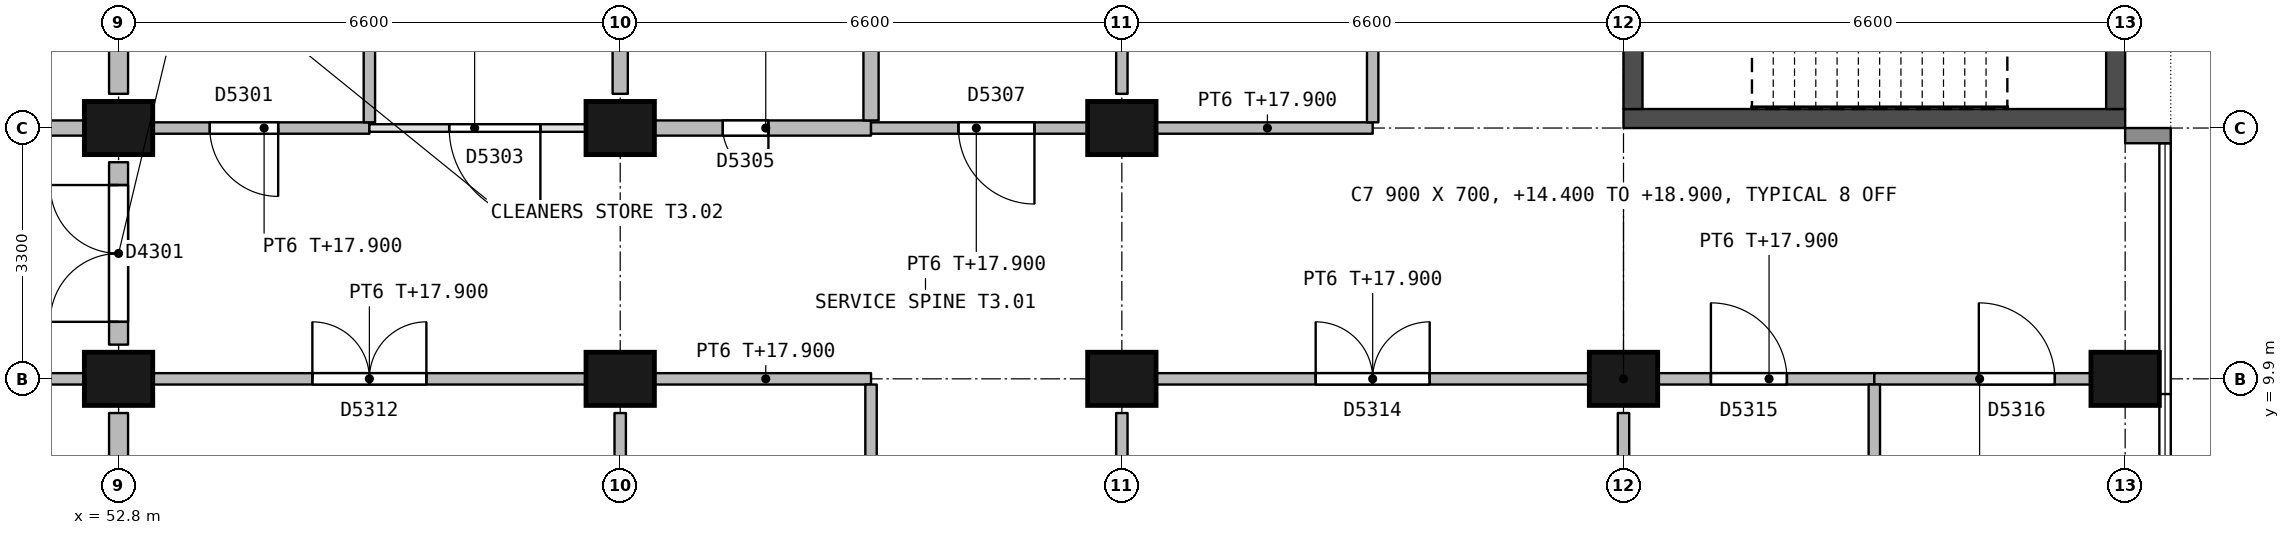
"""IFC4 building model, lengths in metres.
Left out: names, types, materials, properties, quantities, classifications, styles, units other than length and angle.
Written with IfcOpenShell. Run it as: python <this file> out.ifc"""

import sys

from ifc_helpers import new_model, si_unit, direction, frame, frame_2d, origin, origin_2d, place, context, subcontext, project, spatial, rectangle, extrude, element, fill, save


model = new_model("IFC4")
c1 = context("Model", 3, precision=1e-05, world=origin(), true_north=direction((0.0, 1.0)))
c2 = subcontext(c1, "Body", "Model", "MODEL_VIEW")
j1 = project(units=[si_unit("LENGTHUNIT", "METRE"), si_unit("PLANEANGLEUNIT", "RADIAN")], contexts=[c1])
p1 = place(None, origin())
s1 = spatial("IfcSite", under=j1, at=p1, CompositionType="ELEMENT")
p2 = place(p1, origin())
s2 = spatial("IfcBuilding", under=s1, at=p2, CompositionType="ELEMENT")
p3 = place(p2, frame((0.0, 0.0, 14.4)))
s3 = spatial("IfcBuildingStorey", under=s2, at=p3, CompositionType="ELEMENT", Elevation=14.4)
for number, where, z_axis, x_axis in (
    (1, (52.8, 9.9, 0.0), (0.0, 0.0, 1.0), (1.0, 0.0, 0.0)),
    (2, (52.8, 13.2, 0.0), (0.0, 0.0, 1.0), (1.0, 0.0, 0.0)),
    (3, (59.4, 9.9, 0.0), (0.0, 0.0, 1.0), (1.0, 0.0, 0.0)),
    (4, (59.4, 13.2, 0.0), (0.0, 0.0, 1.0), (1.0, 0.0, 0.0)),
    (5, (66.0, 9.9, 0.0), (0.0, 0.0, 1.0), (1.0, 0.0, 0.0)),
    (6, (66.0, 13.2, 0.0), (0.0, 0.0, 1.0), (1.0, 0.0, 0.0)),
    (7, (72.6, 9.9, 0.0), (0.0, 0.0, 1.0), (1.0, 0.0, 0.0)),
    (8, (79.2, 9.9, 0.0), (0.0, 0.0, 1.0), (1.0, 0.0, 0.0)),
):
    element("IfcColumn", number, at=place(p3, frame(where, z_axis=z_axis, x_axis=x_axis)), inside=s3, PredefinedType="COLUMN", context=c2, shape_type="SweptSolid", body=[
        extrude(rectangle(XDim=0.9, YDim=0.7, at=origin_2d()), origin(), (0.0, 0.0, 1.0), 4.5),
    ])
p4 = place(p3, frame((72.6, 13.325, 0.0), z_axis=(0.0, 0.0, 1.0), x_axis=(1.0, 0.0, 0.0)))
e9 = element("IfcWall", 9, at=p4, inside=s3, PredefinedType="SHEAR", context=c2, shape_type="SweptSolid", body=[
    extrude(rectangle(XDim=6.6, YDim=0.25, at=frame_2d((3.3, 0.0))), origin(), (0.0, 0.0, 1.0), 4.2),
])
p5 = place(p3, frame((72.725, 13.45, 0.0), z_axis=(0.0, 0.0, 1.0), x_axis=(0.0, 1.0, 0.0)))
e10 = element("IfcWall", 10, at=p5, inside=s3, PredefinedType="SHEAR", context=c2, shape_type="SweptSolid", body=[
    extrude(rectangle(XDim=9.4, YDim=0.25, at=frame_2d((4.7, 0.0))), origin(), (0.0, 0.0, 1.0), 4.2),
])
p6 = place(p5, frame((4.125, 0.0, 0.0)))
e11 = element("IfcOpeningElement", 11, at=p6, cuts=e10, PredefinedType="OPENING", context=c2, shape_type="SweptSolid", body=[
    extrude(rectangle(XDim=1.2, YDim=2.1, at=frame_2d((0.6, 1.05))), frame((0.0, 0.135, 0.0), z_axis=(0.0, -1.0, 0.0), x_axis=(1.0, 0.0, 0.0)), (0.0, 0.0, 1.0), 0.27),
])
p7 = place(p3, frame((79.075, 13.45, 0.0), z_axis=(0.0, 0.0, 1.0), x_axis=(0.0, 1.0, 0.0)))
e12 = element("IfcWall", 12, at=p7, inside=s3, PredefinedType="SHEAR", context=c2, shape_type="SweptSolid", body=[
    extrude(rectangle(XDim=9.4, YDim=0.25, at=frame_2d((4.7, 0.0))), origin(), (0.0, 0.0, 1.0), 4.2),
])
p8 = place(p7, frame((0.95, 0.0, 0.7)))
e13 = element("IfcOpeningElement", 13, at=p8, cuts=e12, PredefinedType="OPENING", context=c2, shape_type="SweptSolid", body=[
    extrude(rectangle(XDim=1.2, YDim=1.8, at=frame_2d((0.6, 0.9))), frame((0.0, 0.135, 0.0), z_axis=(0.0, -1.0, 0.0), x_axis=(1.0, 0.0, 0.0)), (0.0, 0.0, 1.0), 0.27),
])
p9 = place(p3, frame((79.2, 13.1, 0.0), z_axis=(0.0, 0.0, 1.0), x_axis=(1.0, 0.0, 0.0)))
e14 = element("IfcWall", 14, at=p9, inside=s3, PredefinedType="STANDARD", context=c2, shape_type="SweptSolid", body=[
    extrude(rectangle(XDim=0.6, YDim=0.2, at=frame_2d((0.3, 0.0))), origin(), (0.0, 0.0, 1.0), 3.5),
])
p10 = place(p3, frame((49.5, 13.2, 0.0), z_axis=(0.0, 0.0, 1.0), x_axis=(1.0, 0.0, 0.0)))
e15 = element("IfcWall", 15, at=p10, inside=s3, PredefinedType="PARTITIONING", context=c2, shape_type="SweptSolid", body=[
    extrude(rectangle(XDim=2.85, YDim=0.2, at=frame_2d((1.425, 0.0))), origin(), (0.0, 0.0, 1.0), 3.5),
])
p11 = place(p10, frame((1.35, 0.0, 0.0)))
e16 = element("IfcOpeningElement", 16, at=p11, cuts=e15, PredefinedType="OPENING", context=c2, shape_type="SweptSolid", body=[
    extrude(rectangle(XDim=0.6, YDim=2.1, at=frame_2d((0.3, 1.05))), frame((0.0, 0.11, 0.0), z_axis=(0.0, -1.0, 0.0), x_axis=(1.0, 0.0, 0.0)), (0.0, 0.0, 1.0), 0.22),
])
p12 = place(p3, frame((46.55, 9.9, 0.0), z_axis=(0.0, 0.0, 1.0), x_axis=(1.0, 0.0, 0.0)))
e17 = element("IfcWall", 17, at=p12, inside=s3, PredefinedType="PARTITIONING", context=c2, shape_type="SweptSolid", body=[
    extrude(rectangle(XDim=5.8, YDim=0.15, at=frame_2d((2.9, 0.0))), origin(), (0.0, 0.0, 1.0), 3.5),
])
p13 = place(p12, frame((2.2, 0.0, 0.0)))
e18 = element("IfcOpeningElement", 18, at=p13, cuts=e17, PredefinedType="OPENING", context=c2, shape_type="SweptSolid", body=[
    extrude(rectangle(XDim=1.5, YDim=2.1, at=frame_2d((0.75, 1.05))), frame((0.0, 0.085, 0.0), z_axis=(0.0, -1.0, 0.0), x_axis=(1.0, 0.0, 0.0)), (0.0, 0.0, 1.0), 0.17),
])
p14 = place(p3, frame((52.8, 10.35, 0.0), z_axis=(0.0, 0.0, 1.0), x_axis=(0.0, 1.0, 0.0)))
e19 = element("IfcWall", 19, at=p14, inside=s3, PredefinedType="PARTITIONING", context=c2, shape_type="SweptSolid", body=[
    extrude(rectangle(XDim=2.4, YDim=0.25, at=frame_2d((1.2, 0.0))), origin(), (0.0, 0.0, 1.0), 3.6),
])
p15 = place(p14, frame((0.3, 0.0, 0.0)))
e20 = element("IfcOpeningElement", 20, at=p15, cuts=e19, PredefinedType="OPENING", context=c2, shape_type="SweptSolid", body=[
    extrude(rectangle(XDim=1.8, YDim=2.1, at=frame_2d((0.9, 1.05))), frame((0.0, 0.135, 0.0), z_axis=(0.0, -1.0, 0.0), x_axis=(1.0, 0.0, 0.0)), (0.0, 0.0, 1.0), 0.27),
])
p16 = place(p3, frame((52.8, 13.65, 0.0), z_axis=(0.0, 0.0, 1.0), x_axis=(0.0, 1.0, 0.0)))
e21 = element("IfcWall", 21, at=p16, inside=s3, PredefinedType="PARTITIONING", context=c2, shape_type="SweptSolid", body=[
    extrude(rectangle(XDim=2.75, YDim=0.25, at=frame_2d((1.375, 0.0))), origin(), (0.0, 0.0, 1.0), 3.3),
])
p17 = place(p3, frame((52.8, 3.9, 0.0), z_axis=(0.0, 0.0, 1.0), x_axis=(0.0, 1.0, 0.0)))
e22 = element("IfcWall", 22, at=p17, inside=s3, PredefinedType="PARTITIONING", context=c2, shape_type="SweptSolid", body=[
    extrude(rectangle(XDim=5.55, YDim=0.25, at=frame_2d((2.775, 0.0))), origin(), (0.0, 0.0, 1.0), 3.3),
])
p18 = place(p3, frame((56.1, 13.2, 0.0), z_axis=(0.0, 0.0, 1.0), x_axis=(-1.0, 0.0, 0.0)))
e23 = element("IfcWall", 23, at=p18, inside=s3, PredefinedType="PARTITIONING", context=c2, shape_type="SweptSolid", body=[
    extrude(rectangle(XDim=2.85, YDim=0.15, at=frame_2d((1.425, 0.0))), origin(), (0.0, 0.0, 1.0), 3.5),
])
p19 = place(p18, frame((1.2, 0.0, 0.0)))
e24 = element("IfcOpeningElement", 24, at=p19, cuts=e23, PredefinedType="OPENING", context=c2, shape_type="SweptSolid", body=[
    extrude(rectangle(XDim=0.9, YDim=2.1, at=frame_2d((0.45, 1.05))), frame((0.0, 0.085, 0.0), z_axis=(0.0, -1.0, 0.0), x_axis=(1.0, 0.0, 0.0)), (0.0, 0.0, 1.0), 0.17),
])
p20 = place(p3, frame((56.1, 13.2, 0.0), z_axis=(0.0, 0.0, 1.0), x_axis=(1.0, 0.0, 0.0)))
e25 = element("IfcWall", 25, at=p20, inside=s3, PredefinedType="PARTITIONING", context=c2, shape_type="SweptSolid", body=[
    extrude(rectangle(XDim=2.85, YDim=0.1, at=frame_2d((1.425, 0.0))), origin(), (0.0, 0.0, 1.0), 3.5),
])
p21 = place(p20, frame((1.05, 0.0, 0.0)))
e26 = element("IfcOpeningElement", 26, at=p21, cuts=e25, PredefinedType="OPENING", context=c2, shape_type="SweptSolid", body=[
    extrude(rectangle(XDim=1.2, YDim=2.1, at=frame_2d((0.6, 1.05))), frame((0.0, 0.06, 0.0), z_axis=(0.0, -1.0, 0.0), x_axis=(1.0, 0.0, 0.0)), (0.0, 0.0, 1.0), 0.12),
])
p22 = place(p3, frame((59.85, 13.2, 0.0), z_axis=(0.0, 0.0, 1.0), x_axis=(1.0, 0.0, 0.0)))
e27 = element("IfcWall", 27, at=p22, inside=s3, PredefinedType="PARTITIONING", context=c2, shape_type="SweptSolid", body=[
    extrude(rectangle(XDim=2.85, YDim=0.2, at=frame_2d((1.425, 0.0))), origin(), (0.0, 0.0, 1.0), 3.5),
])
p23 = place(p22, frame((0.9, 0.0, 0.0)))
e28 = element("IfcOpeningElement", 28, at=p23, cuts=e27, PredefinedType="OPENING", context=c2, shape_type="SweptSolid", body=[
    extrude(rectangle(XDim=0.6, YDim=2.1, at=frame_2d((0.3, 1.05))), frame((0.0, 0.11, 0.0), z_axis=(0.0, -1.0, 0.0), x_axis=(1.0, 0.0, 0.0)), (0.0, 0.0, 1.0), 0.22),
])
p24 = place(p3, frame((65.55, 13.2, 0.0), z_axis=(0.0, 0.0, 1.0), x_axis=(-1.0, 0.0, 0.0)))
e29 = element("IfcWall", 29, at=p24, inside=s3, PredefinedType="PARTITIONING", context=c2, shape_type="SweptSolid", body=[
    extrude(rectangle(XDim=2.85, YDim=0.15, at=frame_2d((1.425, 0.0))), origin(), (0.0, 0.0, 1.0), 3.5),
])
p25 = place(p24, frame((0.7, 0.0, 0.0)))
e30 = element("IfcOpeningElement", 30, at=p25, cuts=e29, PredefinedType="OPENING", context=c2, shape_type="SweptSolid", body=[
    extrude(rectangle(XDim=1.0, YDim=2.1, at=frame_2d((0.5, 1.05))), frame((0.0, 0.085, 0.0), z_axis=(0.0, -1.0, 0.0), x_axis=(1.0, 0.0, 0.0)), (0.0, 0.0, 1.0), 0.17),
])
p26 = place(p3, frame((69.3, 13.2, 0.0), z_axis=(0.0, 0.0, 1.0), x_axis=(-1.0, 0.0, 0.0)))
e31 = element("IfcWall", 31, at=p26, inside=s3, PredefinedType="PARTITIONING", context=c2, shape_type="SweptSolid", body=[
    extrude(rectangle(XDim=2.85, YDim=0.15, at=frame_2d((1.425, 0.0))), origin(), (0.0, 0.0, 1.0), 3.5),
])
p27 = place(p3, frame((53.25, 9.9, 0.0), z_axis=(0.0, 0.0, 1.0), x_axis=(1.0, 0.0, 0.0)))
e32 = element("IfcWall", 32, at=p27, inside=s3, PredefinedType="PARTITIONING", context=c2, shape_type="SweptSolid", body=[
    extrude(rectangle(XDim=5.7, YDim=0.15, at=frame_2d((2.85, 0.0))), origin(), (0.0, 0.0, 1.0), 3.5),
])
p28 = place(p27, frame((2.1, 0.0, 0.0)))
e33 = element("IfcOpeningElement", 33, at=p28, cuts=e32, PredefinedType="OPENING", context=c2, shape_type="SweptSolid", body=[
    extrude(rectangle(XDim=1.5, YDim=2.1, at=frame_2d((0.75, 1.05))), frame((0.0, 0.085, 0.0), z_axis=(0.0, -1.0, 0.0), x_axis=(1.0, 0.0, 0.0)), (0.0, 0.0, 1.0), 0.17),
])
p29 = place(p3, frame((59.85, 9.9, 0.0), z_axis=(0.0, 0.0, 1.0), x_axis=(1.0, 0.0, 0.0)))
e34 = element("IfcWall", 34, at=p29, inside=s3, PredefinedType="PARTITIONING", context=c2, shape_type="SweptSolid", body=[
    extrude(rectangle(XDim=2.85, YDim=0.15, at=frame_2d((1.425, 0.0))), origin(), (0.0, 0.0, 1.0), 3.5),
])
p30 = place(p3, frame((66.45, 9.9, 0.0), z_axis=(0.0, 0.0, 1.0), x_axis=(1.0, 0.0, 0.0)))
e35 = element("IfcWall", 35, at=p30, inside=s3, PredefinedType="PARTITIONING", context=c2, shape_type="SweptSolid", body=[
    extrude(rectangle(XDim=5.7, YDim=0.15, at=frame_2d((2.85, 0.0))), origin(), (0.0, 0.0, 1.0), 3.5),
])
p31 = place(p30, frame((2.1, 0.0, 0.0)))
e36 = element("IfcOpeningElement", 36, at=p31, cuts=e35, PredefinedType="OPENING", context=c2, shape_type="SweptSolid", body=[
    extrude(rectangle(XDim=1.5, YDim=2.1, at=frame_2d((0.75, 1.05))), frame((0.0, 0.085, 0.0), z_axis=(0.0, -1.0, 0.0), x_axis=(1.0, 0.0, 0.0)), (0.0, 0.0, 1.0), 0.17),
])
p32 = place(p3, frame((73.05, 9.9, 0.0), z_axis=(0.0, 0.0, 1.0), x_axis=(1.0, 0.0, 0.0)))
e37 = element("IfcWall", 37, at=p32, inside=s3, PredefinedType="PARTITIONING", context=c2, shape_type="SweptSolid", body=[
    extrude(rectangle(XDim=2.85, YDim=0.15, at=frame_2d((1.425, 0.0))), origin(), (0.0, 0.0, 1.0), 3.5),
])
p33 = place(p32, frame((0.7, 0.0, 0.0)))
e38 = element("IfcOpeningElement", 38, at=p33, cuts=e37, PredefinedType="OPENING", context=c2, shape_type="SweptSolid", body=[
    extrude(rectangle(XDim=1.0, YDim=2.1, at=frame_2d((0.5, 1.05))), frame((0.0, 0.085, 0.0), z_axis=(0.0, -1.0, 0.0), x_axis=(1.0, 0.0, 0.0)), (0.0, 0.0, 1.0), 0.17),
])
p34 = place(p3, frame((75.9, 9.9, 0.0), z_axis=(0.0, 0.0, 1.0), x_axis=(1.0, 0.0, 0.0)))
e39 = element("IfcWall", 39, at=p34, inside=s3, PredefinedType="PARTITIONING", context=c2, shape_type="SweptSolid", body=[
    extrude(rectangle(XDim=2.85, YDim=0.15, at=frame_2d((1.425, 0.0))), origin(), (0.0, 0.0, 1.0), 3.5),
])
p35 = place(p34, frame((1.375, 0.0, 0.0)))
e40 = element("IfcOpeningElement", 40, at=p35, cuts=e39, PredefinedType="OPENING", context=c2, shape_type="SweptSolid", body=[
    extrude(rectangle(XDim=1.0, YDim=2.1, at=frame_2d((0.5, 1.05))), frame((0.0, 0.085, 0.0), z_axis=(0.0, -1.0, 0.0), x_axis=(1.0, 0.0, 0.0)), (0.0, 0.0, 1.0), 0.17),
])
p36 = place(p3, frame((56.1, 13.275, 0.0), z_axis=(0.0, 0.0, 1.0), x_axis=(0.0, 1.0, 0.0)))
e41 = element("IfcWall", 41, at=p36, inside=s3, PredefinedType="PARTITIONING", context=c2, shape_type="SweptSolid", body=[
    extrude(rectangle(XDim=3.15, YDim=0.15, at=frame_2d((1.575, 0.0))), origin(), (0.0, 0.0, 1.0), 4.2),
])
p37 = place(p3, frame((59.4, 13.65, 0.0), z_axis=(0.0, 0.0, 1.0), x_axis=(0.0, 1.0, 0.0)))
e42 = element("IfcWall", 42, at=p37, inside=s3, PredefinedType="PARTITIONING", context=c2, shape_type="SweptSolid", body=[
    extrude(rectangle(XDim=2.85, YDim=0.2, at=frame_2d((1.425, 0.0))), origin(), (0.0, 0.0, 1.0), 3.3),
])
p38 = place(p3, frame((62.7, 13.3, 0.0), z_axis=(0.0, 0.0, 1.0), x_axis=(0.0, 1.0, 0.0)))
e43 = element("IfcWall", 43, at=p38, inside=s3, PredefinedType="PARTITIONING", context=c2, shape_type="SweptSolid", body=[
    extrude(rectangle(XDim=3.1, YDim=0.2, at=frame_2d((1.55, 0.0))), origin(), (0.0, 0.0, 1.0), 4.2),
])
p39 = place(p3, frame((66.0, 13.65, 0.0), z_axis=(0.0, 0.0, 1.0), x_axis=(0.0, 1.0, 0.0)))
e44 = element("IfcWall", 44, at=p39, inside=s3, PredefinedType="PARTITIONING", context=c2, shape_type="SweptSolid", body=[
    extrude(rectangle(XDim=9.0, YDim=0.15, at=frame_2d((4.5, 0.0))), origin(), (0.0, 0.0, 1.0), 3.3),
])
p40 = place(p3, frame((69.3, 23.55, 0.0), z_axis=(0.0, 0.0, 1.0), x_axis=(0.0, -1.0, 0.0)))
e45 = element("IfcWall", 45, at=p40, inside=s3, PredefinedType="PARTITIONING", context=c2, shape_type="SweptSolid", body=[
    extrude(rectangle(XDim=10.275, YDim=0.15, at=frame_2d((5.138, 0.0))), origin(), (0.0, 0.0, 1.0), 4.2),
])
p41 = place(p40, frame((4.275, 0.0, 0.0)))
e46 = element("IfcOpeningElement", 46, at=p41, cuts=e45, PredefinedType="OPENING", context=c2, shape_type="SweptSolid", body=[
    extrude(rectangle(XDim=1.8, YDim=2.4, at=frame_2d((0.9, 1.2))), frame((0.0, 0.085, 0.0), z_axis=(0.0, -1.0, 0.0), x_axis=(1.0, 0.0, 0.0)), (0.0, 0.0, 1.0), 0.17),
])
p42 = place(p3, frame((59.4, 3.975, 0.0), z_axis=(0.0, 0.0, 1.0), x_axis=(0.0, 1.0, 0.0)))
e47 = element("IfcWall", 47, at=p42, inside=s3, PredefinedType="PARTITIONING", context=c2, shape_type="SweptSolid", body=[
    extrude(rectangle(XDim=5.475, YDim=0.15, at=frame_2d((2.737, 0.0))), origin(), (0.0, 0.0, 1.0), 3.3),
])
p43 = place(p3, frame((62.7, 9.825, 0.0), z_axis=(0.0, 0.0, 1.0), x_axis=(0.0, -1.0, 0.0)))
e48 = element("IfcWall", 48, at=p43, inside=s3, PredefinedType="PARTITIONING", context=c2, shape_type="SweptSolid", body=[
    extrude(rectangle(XDim=5.85, YDim=0.15, at=frame_2d((2.925, 0.0))), origin(), (0.0, 0.0, 1.0), 4.2),
])
p44 = place(p43, frame((2.425, 0.0, 0.0)))
e49 = element("IfcOpeningElement", 49, at=p44, cuts=e48, PredefinedType="OPENING", context=c2, shape_type="SweptSolid", body=[
    extrude(rectangle(XDim=1.0, YDim=2.1, at=frame_2d((0.5, 1.05))), frame((0.0, 0.085, 0.0), z_axis=(0.0, -1.0, 0.0), x_axis=(1.0, 0.0, 0.0)), (0.0, 0.0, 1.0), 0.17),
])
for number, where, z_axis, x_axis in (
    (50, (66.0, 3.975, 0.0), (0.0, 0.0, 1.0), (0.0, 1.0, 0.0)),
    (51, (72.6, 3.975, 0.0), (0.0, 0.0, 1.0), (0.0, 1.0, 0.0)),
):
    element("IfcWall", number, at=place(p3, frame(where, z_axis=z_axis, x_axis=x_axis)), inside=s3, PredefinedType="PARTITIONING", context=c2, shape_type="SweptSolid", body=[
        extrude(rectangle(XDim=5.475, YDim=0.15, at=frame_2d((2.737, 0.0))), origin(), (0.0, 0.0, 1.0), 3.3),
    ])
p45 = place(p3, frame((75.9, 3.975, 0.0), z_axis=(0.0, 0.0, 1.0), x_axis=(0.0, 1.0, 0.0)))
e52 = element("IfcWall", 52, at=p45, inside=s3, PredefinedType="PARTITIONING", context=c2, shape_type="SweptSolid", body=[
    extrude(rectangle(XDim=5.85, YDim=0.15, at=frame_2d((2.925, 0.0))), origin(), (0.0, 0.0, 1.0), 4.2),
])
p46 = place(p15, origin())
e53 = element("IfcDoor", 53, at=p46, inside=s3, OperationType="DOUBLE_DOOR_SINGLE_SWING", PredefinedType="DOOR", context=c2, shape_type="SweptSolid", body=[
    extrude(rectangle(XDim=1.8, YDim=2.1, at=frame_2d((0.9, 1.05))), frame((0.0, 0.03, 0.0), z_axis=(0.0, -1.0, 0.0), x_axis=(1.0, 0.0, 0.0)), (0.0, 0.0, 1.0), 0.06),
])
fill(e20, e53)
p47 = place(p19, origin())
e54 = element("IfcDoor", 54, at=p47, inside=s3, OperationType="SINGLE_SWING_LEFT", PredefinedType="DOOR", context=c2, shape_type="SweptSolid", body=[
    extrude(rectangle(XDim=0.9, YDim=2.1, at=frame_2d((0.45, 1.05))), frame((0.0, 0.027, 0.0), z_axis=(0.0, -1.0, 0.0), x_axis=(1.0, 0.0, 0.0)), (0.0, 0.0, 1.0), 0.054),
])
fill(e24, e54)
p48 = place(p21, origin())
e55 = element("IfcDoor", 55, at=p48, inside=s3, OperationType="SINGLE_SWING_RIGHT", PredefinedType="DOOR", context=c2, shape_type="SweptSolid", body=[
    extrude(rectangle(XDim=1.2, YDim=2.1, at=frame_2d((0.6, 1.05))), frame((0.0, 0.022, 0.0), z_axis=(0.0, -1.0, 0.0), x_axis=(1.0, 0.0, 0.0)), (0.0, 0.0, 1.0), 0.044),
])
fill(e26, e55)
p49 = place(p23, origin())
e56 = element("IfcDoor", 56, at=p49, inside=s3, OperationType="SINGLE_SWING_RIGHT", PredefinedType="DOOR", context=c2, shape_type="SweptSolid", body=[
    extrude(rectangle(XDim=0.6, YDim=2.1, at=frame_2d((0.3, 1.05))), frame((0.0, 0.03, 0.0), z_axis=(0.0, -1.0, 0.0), x_axis=(1.0, 0.0, 0.0)), (0.0, 0.0, 1.0), 0.06),
])
fill(e28, e56)
p50 = place(p25, origin())
e57 = element("IfcDoor", 57, at=p50, inside=s3, OperationType="SINGLE_SWING_LEFT", PredefinedType="DOOR", context=c2, shape_type="SweptSolid", body=[
    extrude(rectangle(XDim=1.0, YDim=2.1, at=frame_2d((0.5, 1.05))), frame((0.0, 0.027, 0.0), z_axis=(0.0, -1.0, 0.0), x_axis=(1.0, 0.0, 0.0)), (0.0, 0.0, 1.0), 0.054),
])
fill(e30, e57)
p51 = place(p28, origin())
e58 = element("IfcDoor", 58, at=p51, inside=s3, OperationType="DOUBLE_DOOR_SINGLE_SWING", PredefinedType="DOOR", context=c2, shape_type="SweptSolid", body=[
    extrude(rectangle(XDim=1.5, YDim=2.1, at=frame_2d((0.75, 1.05))), frame((0.0, 0.027, 0.0), z_axis=(0.0, -1.0, 0.0), x_axis=(1.0, 0.0, 0.0)), (0.0, 0.0, 1.0), 0.054),
])
fill(e33, e58)
p52 = place(p31, origin())
e59 = element("IfcDoor", 59, at=p52, inside=s3, OperationType="DOUBLE_DOOR_SINGLE_SWING", PredefinedType="DOOR", context=c2, shape_type="SweptSolid", body=[
    extrude(rectangle(XDim=1.5, YDim=2.1, at=frame_2d((0.75, 1.05))), frame((0.0, 0.027, 0.0), z_axis=(0.0, -1.0, 0.0), x_axis=(1.0, 0.0, 0.0)), (0.0, 0.0, 1.0), 0.054),
])
fill(e36, e59)
p53 = place(p33, origin())
e60 = element("IfcDoor", 60, at=p53, inside=s3, OperationType="SINGLE_SWING_LEFT", PredefinedType="DOOR", context=c2, shape_type="SweptSolid", body=[
    extrude(rectangle(XDim=1.0, YDim=2.1, at=frame_2d((0.5, 1.05))), frame((0.0, 0.027, 0.0), z_axis=(0.0, -1.0, 0.0), x_axis=(1.0, 0.0, 0.0)), (0.0, 0.0, 1.0), 0.054),
])
fill(e38, e60)
p54 = place(p35, origin())
e61 = element("IfcDoor", 61, at=p54, inside=s3, OperationType="SINGLE_SWING_LEFT", PredefinedType="DOOR", context=c2, shape_type="SweptSolid", body=[
    extrude(rectangle(XDim=1.0, YDim=2.1, at=frame_2d((0.5, 1.05))), frame((0.0, 0.027, 0.0), z_axis=(0.0, -1.0, 0.0), x_axis=(1.0, 0.0, 0.0)), (0.0, 0.0, 1.0), 0.054),
])
fill(e40, e61)
save(model, sys.argv[1])
